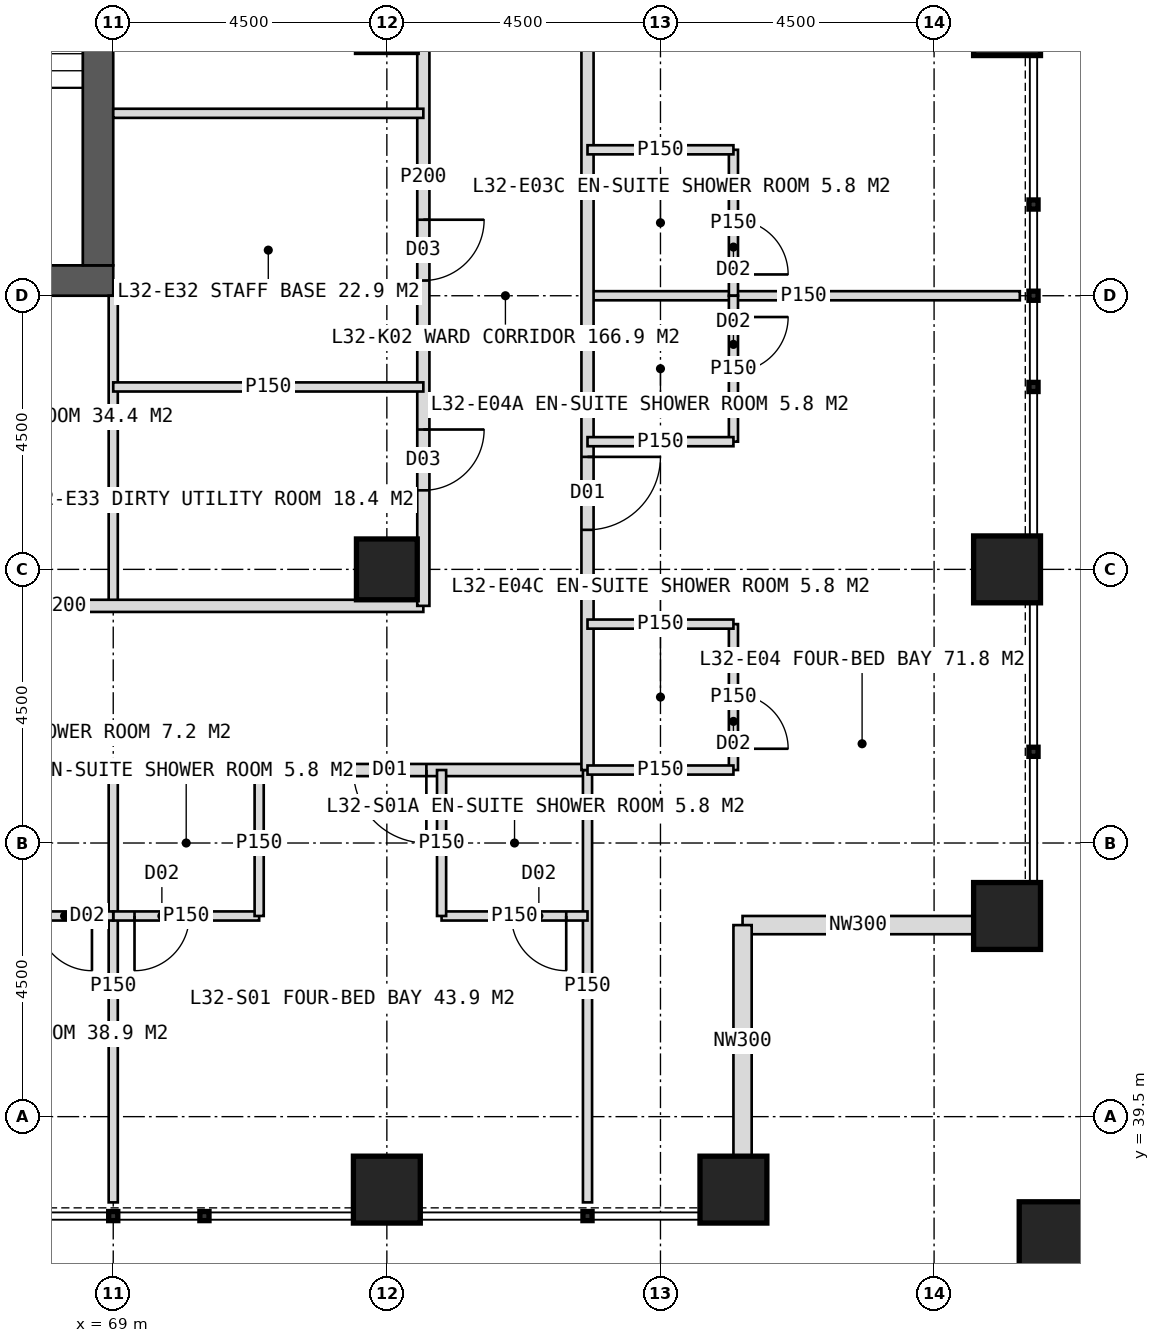
"""IFC4 building model, lengths in metres.
Left out: names, types, materials, properties, quantities, classifications, styles, units other than length and angle.
Written with IfcOpenShell. Run it as: python <this file> out.ifc"""

import sys

from ifc_helpers import new_model, si_unit, direction, frame, frame_2d, origin, origin_2d, place, context, subcontext, project, spatial, rectangle, hollow_rectangle, extrude, element, fill, save


model = new_model("IFC4")
c1 = context("Model", 3, precision=1e-05, world=origin(), true_north=direction((0.0, 1.0)))
c2 = subcontext(c1, "Body", "Model", "MODEL_VIEW")
j1 = project(units=[si_unit("LENGTHUNIT", "METRE"), si_unit("PLANEANGLEUNIT", "RADIAN")], contexts=[c1])
p1 = place(None, origin())
s1 = spatial("IfcSite", under=j1, at=p1, CompositionType="ELEMENT")
p2 = place(p1, origin())
s2 = spatial("IfcBuilding", under=s1, at=p2, CompositionType="ELEMENT")
p3 = place(p2, frame((0.0, 0.0, 136.0)))
s3 = spatial("IfcBuildingStorey", under=s2, at=p3, CompositionType="ELEMENT", Elevation=136.0)
p4 = place(p3, frame((51.0, 53.25, 0.0), z_axis=(0.0, 0.0, 1.0), x_axis=(1.0, 0.0, 0.0)))
e1 = element("IfcWall", 1, at=p4, inside=s3, PredefinedType="SHEAR", context=c2, shape_type="SweptSolid", body=[
    extrude(rectangle(XDim=18.0, YDim=0.5, at=frame_2d((9.0, 0.0))), origin(), (0.0, 0.0, 1.0), 4.0),
])
p5 = place(p4, frame((8.1, 0.0, 0.0)))
e2 = element("IfcOpeningElement", 2, at=p5, cuts=e1, PredefinedType="OPENING", context=c2, shape_type="SweptSolid", body=[
    extrude(rectangle(XDim=1.8, YDim=2.2, at=frame_2d((0.9, 1.1))), frame((0.0, 0.26, 0.0), z_axis=(0.0, -1.0, 0.0), x_axis=(1.0, 0.0, 0.0)), (0.0, 0.0, 1.0), 0.52),
])
p6 = place(p3, frame((68.75, 53.5, 0.0), z_axis=(0.0, 0.0, 1.0), x_axis=(0.0, 1.0, 0.0)))
e3 = element("IfcWall", 3, at=p6, inside=s3, PredefinedType="SHEAR", context=c2, shape_type="SweptSolid", body=[
    extrude(rectangle(XDim=17.0, YDim=0.5, at=frame_2d((8.5, 0.0))), origin(), (0.0, 0.0, 1.0), 4.0),
])
p7 = place(p6, frame((9.5, 0.0, 0.0)))
e4 = element("IfcOpeningElement", 4, at=p7, cuts=e3, PredefinedType="OPENING", context=c2, shape_type="SweptSolid", body=[
    extrude(rectangle(XDim=1.5, YDim=2.2, at=frame_2d((0.75, 1.1))), frame((0.0, 0.26, 0.0), z_axis=(0.0, -1.0, 0.0), x_axis=(1.0, 0.0, 0.0)), (0.0, 0.0, 1.0), 0.52),
])
p8 = place(p3, frame((73.5, 48.5, 0.0), z_axis=(0.0, 0.0, 1.0), x_axis=(1.0, 0.0, 0.0)))
e5 = element("IfcColumn", 5, at=p8, inside=s3, PredefinedType="COLUMN", context=c2, shape_type="SweptSolid", body=[
    extrude(hollow_rectangle(XDim=1.0, YDim=1.0, WallThickness=0.1, at=origin_2d()), origin(), (0.0, 0.0, 1.0), 4.0),
])
for number, where, z_axis, x_axis in (
    (6, (83.7, 42.8, 0.0), (0.0, 0.0, 1.0), (1.0, 0.0, 0.0)),
    (7, (83.7, 48.5, 0.0), (0.0, 0.0, 1.0), (1.0, 0.0, 0.0)),
    (8, (83.7, 57.5, 0.0), (0.0, 0.0, 1.0), (1.0, 0.0, 0.0)),
    (9, (73.5, 38.3, 0.0), (0.0, 0.0, 1.0), (1.0, 0.0, 0.0)),
    (10, (79.2, 38.3, 0.0), (0.0, 0.0, 1.0), (1.0, 0.0, 0.0)),
):
    element("IfcColumn", number, at=place(p3, frame(where, z_axis=z_axis, x_axis=x_axis)), inside=s3, PredefinedType="COLUMN", context=c2, shape_type="SweptSolid", body=[
        extrude(hollow_rectangle(XDim=1.1, YDim=1.1, WallThickness=0.1, at=origin_2d()), origin(), (0.0, 0.0, 1.0), 4.0),
    ])
p9 = place(p3, frame((84.6, 37.4, 0.0), z_axis=(0.0, 0.0, 1.0), x_axis=(1.0, 0.0, 0.0)))
e11 = element("IfcColumn", 11, at=p9, inside=s3, PredefinedType="COLUMN", context=c2, shape_type="SweptSolid", body=[
    extrude(hollow_rectangle(XDim=1.4, YDim=1.4, WallThickness=0.08, at=origin_2d()), origin(), (0.0, 0.0, 1.0), 4.0),
])
for number, where, z_axis, x_axis in (
    (12, (83.15, 42.65, 0.0), (0.0, 0.0, 1.0), (-1.0, 0.0, 0.0)),
    (13, (79.35, 42.65, 0.0), (0.0, 0.0, 1.0), (0.0, -1.0, 0.0)),
):
    element("IfcWall", number, at=place(p3, frame(where, z_axis=z_axis, x_axis=x_axis)), inside=s3, PredefinedType="ELEMENTEDWALL", context=c2, shape_type="SweptSolid", body=[
        extrude(rectangle(XDim=3.8, YDim=0.3, at=frame_2d((1.9, 0.0))), origin(), (0.0, 0.0, 1.0), 4.0),
    ])
p10 = place(p3, frame((69.0, 45.2, 0.0), z_axis=(0.0, 0.0, 1.0), x_axis=(0.0, -1.0, 0.0)))
e14 = element("IfcWall", 14, at=p10, inside=s3, PredefinedType="PARTITIONING", context=c2, shape_type="SweptSolid", body=[
    extrude(rectangle(XDim=7.11, YDim=0.15, at=frame_2d((3.555, 0.0))), origin(), (0.0, 0.0, 1.0), 3.75),
])
p11 = place(p3, frame((76.8, 45.2, 0.0), z_axis=(0.0, 0.0, 1.0), x_axis=(-1.0, 0.0, 0.0)))
e15 = element("IfcWall", 15, at=p11, inside=s3, PredefinedType="PARTITIONING", context=c2, shape_type="SweptSolid", body=[
    extrude(rectangle(XDim=33.6, YDim=0.2, at=frame_2d((16.8, 0.0))), origin(), (0.0, 0.0, 1.0), 3.75),
])
p12 = place(p11, frame((2.65, 0.0, 0.0)))
e16 = element("IfcOpeningElement", 16, at=p12, cuts=e15, PredefinedType="OPENING", context=c2, shape_type="SweptSolid", body=[
    extrude(rectangle(XDim=1.2, YDim=2.2, at=frame_2d((0.6, 1.1))), frame((0.0, 0.11, 0.0), z_axis=(0.0, -1.0, 0.0), x_axis=(1.0, 0.0, 0.0)), (0.0, 0.0, 1.0), 0.22),
])
p13 = place(p11, frame((11.05, 0.0, 0.0)))
e17 = element("IfcOpeningElement", 17, at=p13, cuts=e15, PredefinedType="OPENING", context=c2, shape_type="SweptSolid", body=[
    extrude(rectangle(XDim=1.2, YDim=2.2, at=frame_2d((0.6, 1.1))), frame((0.0, 0.11, 0.0), z_axis=(0.0, -1.0, 0.0), x_axis=(1.0, 0.0, 0.0)), (0.0, 0.0, 1.0), 0.22),
])
p14 = place(p11, frame((17.95, 0.0, 0.0)))
e18 = element("IfcOpeningElement", 18, at=p14, cuts=e15, PredefinedType="OPENING", context=c2, shape_type="SweptSolid", body=[
    extrude(rectangle(XDim=1.2, YDim=2.2, at=frame_2d((0.6, 1.1))), frame((0.0, 0.11, 0.0), z_axis=(0.0, -1.0, 0.0), x_axis=(1.0, 0.0, 0.0)), (0.0, 0.0, 1.0), 0.22),
])
p15 = place(p11, frame((26.95, 0.0, 0.0)))
e19 = element("IfcOpeningElement", 19, at=p15, cuts=e15, PredefinedType="OPENING", context=c2, shape_type="SweptSolid", body=[
    extrude(rectangle(XDim=1.2, YDim=2.2, at=frame_2d((0.6, 1.1))), frame((0.0, 0.11, 0.0), z_axis=(0.0, -1.0, 0.0), x_axis=(1.0, 0.0, 0.0)), (0.0, 0.0, 1.0), 0.22),
])
p16 = place(p3, frame((76.8, 45.2, 0.0), z_axis=(0.0, 0.0, 1.0), x_axis=(0.0, -1.0, 0.0)))
e20 = element("IfcWall", 20, at=p16, inside=s3, PredefinedType="PARTITIONING", context=c2, shape_type="SweptSolid", body=[
    extrude(rectangle(XDim=7.11, YDim=0.15, at=frame_2d((3.555, 0.0))), origin(), (0.0, 0.0, 1.0), 3.75),
])
p17 = place(p3, frame((76.8, 42.8, 0.0), z_axis=(0.0, 0.0, 1.0), x_axis=(-1.0, 0.0, 0.0)))
e21 = element("IfcWall", 21, at=p17, inside=s3, PredefinedType="PARTITIONING", context=c2, shape_type="SweptSolid", body=[
    extrude(rectangle(XDim=2.4, YDim=0.15, at=frame_2d((1.2, 0.0))), origin(), (0.0, 0.0, 1.0), 2.997),
])
p18 = place(p17, frame((0.35, 0.0, 0.0)))
e22 = element("IfcOpeningElement", 22, at=p18, cuts=e21, PredefinedType="OPENING", context=c2, shape_type="SweptSolid", body=[
    extrude(rectangle(XDim=0.9, YDim=2.1, at=frame_2d((0.45, 1.05))), frame((0.0, 0.085, 0.0), z_axis=(0.0, -1.0, 0.0), x_axis=(1.0, 0.0, 0.0)), (0.0, 0.0, 1.0), 0.17),
])
p19 = place(p3, frame((74.4, 45.2, 0.0), z_axis=(0.0, 0.0, 1.0), x_axis=(0.0, -1.0, 0.0)))
e23 = element("IfcWall", 23, at=p19, inside=s3, PredefinedType="PARTITIONING", context=c2, shape_type="SweptSolid", body=[
    extrude(rectangle(XDim=2.4, YDim=0.15, at=frame_2d((1.2, 0.0))), origin(), (0.0, 0.0, 1.0), 3.75),
])
p20 = place(p3, frame((71.4, 42.8, 0.0), z_axis=(0.0, 0.0, 1.0), x_axis=(-1.0, 0.0, 0.0)))
e24 = element("IfcWall", 24, at=p20, inside=s3, PredefinedType="PARTITIONING", context=c2, shape_type="SweptSolid", body=[
    extrude(rectangle(XDim=2.4, YDim=0.15, at=frame_2d((1.2, 0.0))), origin(), (0.0, 0.0, 1.0), 3.75),
])
p21 = place(p20, frame((1.15, 0.0, 0.0)))
e25 = element("IfcOpeningElement", 25, at=p21, cuts=e24, PredefinedType="OPENING", context=c2, shape_type="SweptSolid", body=[
    extrude(rectangle(XDim=0.9, YDim=2.1, at=frame_2d((0.45, 1.05))), frame((0.0, 0.085, 0.0), z_axis=(0.0, -1.0, 0.0), x_axis=(1.0, 0.0, 0.0)), (0.0, 0.0, 1.0), 0.17),
])
p22 = place(p3, frame((71.4, 45.2, 0.0), z_axis=(0.0, 0.0, 1.0), x_axis=(0.0, -1.0, 0.0)))
e26 = element("IfcWall", 26, at=p22, inside=s3, PredefinedType="PARTITIONING", context=c2, shape_type="SweptSolid", body=[
    extrude(rectangle(XDim=2.4, YDim=0.15, at=frame_2d((1.2, 0.0))), origin(), (0.0, 0.0, 1.0), 3.75),
])
p23 = place(p3, frame((69.0, 42.8, 0.0), z_axis=(0.0, 0.0, 1.0), x_axis=(-1.0, 0.0, 0.0)))
e27 = element("IfcWall", 27, at=p23, inside=s3, PredefinedType="PARTITIONING", context=c2, shape_type="SweptSolid", body=[
    extrude(rectangle(XDim=3.0, YDim=0.15, at=frame_2d((1.5, 0.0))), origin(), (0.0, 0.0, 1.0), 3.75),
])
p24 = place(p23, frame((0.35, 0.0, 0.0)))
e28 = element("IfcOpeningElement", 28, at=p24, cuts=e27, PredefinedType="OPENING", context=c2, shape_type="SweptSolid", body=[
    extrude(rectangle(XDim=0.9, YDim=2.1, at=frame_2d((0.45, 1.05))), frame((0.0, 0.085, 0.0), z_axis=(0.0, -1.0, 0.0), x_axis=(1.0, 0.0, 0.0)), (0.0, 0.0, 1.0), 0.17),
])
p25 = place(p3, frame((69.0, 53.0, 0.0), z_axis=(0.0, 0.0, 1.0), x_axis=(0.0, -1.0, 0.0)))
e29 = element("IfcWall", 29, at=p25, inside=s3, PredefinedType="PARTITIONING", context=c2, shape_type="SweptSolid", body=[
    extrude(rectangle(XDim=5.1, YDim=0.15, at=frame_2d((2.55, 0.0))), origin(), (0.0, 0.0, 1.0), 3.75),
])
p26 = place(p3, frame((74.1, 47.9, 0.0), z_axis=(0.0, 0.0, 1.0), x_axis=(-1.0, 0.0, 0.0)))
e30 = element("IfcWall", 30, at=p26, inside=s3, PredefinedType="PARTITIONING", context=c2, shape_type="SweptSolid", body=[
    extrude(rectangle(XDim=11.85, YDim=0.2, at=frame_2d((5.925, 0.0))), origin(), (0.0, 0.0, 1.0), 3.75),
])
p27 = place(p26, frame((6.55, 0.0, 0.0)))
e31 = element("IfcOpeningElement", 31, at=p27, cuts=e30, PredefinedType="OPENING", context=c2, shape_type="SweptSolid", body=[
    extrude(rectangle(XDim=1.0, YDim=2.1, at=frame_2d((0.5, 1.05))), frame((0.0, 0.11, 0.0), z_axis=(0.0, -1.0, 0.0), x_axis=(1.0, 0.0, 0.0)), (0.0, 0.0, 1.0), 0.22),
])
p28 = place(p3, frame((76.8, 53.0, 0.0), z_axis=(0.0, 0.0, 1.0), x_axis=(1.0, 0.0, 0.0)))
e32 = element("IfcWall", 32, at=p28, inside=s3, PredefinedType="PARTITIONING", context=c2, shape_type="SweptSolid", body=[
    extrude(rectangle(XDim=7.11, YDim=0.15, at=frame_2d((3.555, 0.0))), origin(), (0.0, 0.0, 1.0), 3.75),
])
p29 = place(p3, frame((76.8, 78.8, 0.0), z_axis=(0.0, 0.0, 1.0), x_axis=(0.0, -1.0, 0.0)))
e33 = element("IfcWall", 33, at=p29, inside=s3, PredefinedType="PARTITIONING", context=c2, shape_type="SweptSolid", body=[
    extrude(rectangle(XDim=33.6, YDim=0.2, at=frame_2d((16.8, 0.0))), origin(), (0.0, 0.0, 1.0), 3.75),
])
p30 = place(p29, frame((2.65, 0.0, 0.0)))
e34 = element("IfcOpeningElement", 34, at=p30, cuts=e33, PredefinedType="OPENING", context=c2, shape_type="SweptSolid", body=[
    extrude(rectangle(XDim=1.2, YDim=2.2, at=frame_2d((0.6, 1.1))), frame((0.0, 0.11, 0.0), z_axis=(0.0, -1.0, 0.0), x_axis=(1.0, 0.0, 0.0)), (0.0, 0.0, 1.0), 0.22),
])
p31 = place(p29, frame((8.95, 0.0, 0.0)))
e35 = element("IfcOpeningElement", 35, at=p31, cuts=e33, PredefinedType="OPENING", context=c2, shape_type="SweptSolid", body=[
    extrude(rectangle(XDim=1.2, YDim=2.2, at=frame_2d((0.6, 1.1))), frame((0.0, 0.11, 0.0), z_axis=(0.0, -1.0, 0.0), x_axis=(1.0, 0.0, 0.0)), (0.0, 0.0, 1.0), 0.22),
])
p32 = place(p29, frame((19.45, 0.0, 0.0)))
e36 = element("IfcOpeningElement", 36, at=p32, cuts=e33, PredefinedType="OPENING", context=c2, shape_type="SweptSolid", body=[
    extrude(rectangle(XDim=1.2, YDim=2.2, at=frame_2d((0.6, 1.1))), frame((0.0, 0.11, 0.0), z_axis=(0.0, -1.0, 0.0), x_axis=(1.0, 0.0, 0.0)), (0.0, 0.0, 1.0), 0.22),
])
p33 = place(p29, frame((28.45, 0.0, 0.0)))
e37 = element("IfcOpeningElement", 37, at=p33, cuts=e33, PredefinedType="OPENING", context=c2, shape_type="SweptSolid", body=[
    extrude(rectangle(XDim=1.2, YDim=2.2, at=frame_2d((0.6, 1.1))), frame((0.0, 0.11, 0.0), z_axis=(0.0, -1.0, 0.0), x_axis=(1.0, 0.0, 0.0)), (0.0, 0.0, 1.0), 0.22),
])
p34 = place(p3, frame((79.2, 55.4, 0.0), z_axis=(0.0, 0.0, 1.0), x_axis=(0.0, -1.0, 0.0)))
e38 = element("IfcWall", 38, at=p34, inside=s3, PredefinedType="PARTITIONING", context=c2, shape_type="SweptSolid", body=[
    extrude(rectangle(XDim=2.4, YDim=0.15, at=frame_2d((1.2, 0.0))), origin(), (0.0, 0.0, 1.0), 3.75),
])
p35 = place(p34, frame((1.15, 0.0, 0.0)))
e39 = element("IfcOpeningElement", 39, at=p35, cuts=e38, PredefinedType="OPENING", context=c2, shape_type="SweptSolid", body=[
    extrude(rectangle(XDim=0.9, YDim=2.1, at=frame_2d((0.45, 1.05))), frame((0.0, 0.085, 0.0), z_axis=(0.0, -1.0, 0.0), x_axis=(1.0, 0.0, 0.0)), (0.0, 0.0, 1.0), 0.17),
])
p36 = place(p3, frame((76.8, 55.4, 0.0), z_axis=(0.0, 0.0, 1.0), x_axis=(1.0, 0.0, 0.0)))
e40 = element("IfcWall", 40, at=p36, inside=s3, PredefinedType="PARTITIONING", context=c2, shape_type="SweptSolid", body=[
    extrude(rectangle(XDim=2.4, YDim=0.15, at=frame_2d((1.2, 0.0))), origin(), (0.0, 0.0, 1.0), 3.75),
])
p37 = place(p3, frame((79.2, 53.0, 0.0), z_axis=(0.0, 0.0, 1.0), x_axis=(0.0, -1.0, 0.0)))
e41 = element("IfcWall", 41, at=p37, inside=s3, PredefinedType="PARTITIONING", context=c2, shape_type="SweptSolid", body=[
    extrude(rectangle(XDim=2.4, YDim=0.15, at=frame_2d((1.2, 0.0))), origin(), (0.0, 0.0, 1.0), 3.75),
])
p38 = place(p37, frame((0.35, 0.0, 0.0)))
e42 = element("IfcOpeningElement", 42, at=p38, cuts=e41, PredefinedType="OPENING", context=c2, shape_type="SweptSolid", body=[
    extrude(rectangle(XDim=0.9, YDim=2.1, at=frame_2d((0.45, 1.05))), frame((0.0, 0.085, 0.0), z_axis=(0.0, -1.0, 0.0), x_axis=(1.0, 0.0, 0.0)), (0.0, 0.0, 1.0), 0.17),
])
p39 = place(p3, frame((76.8, 50.6, 0.0), z_axis=(0.0, 0.0, 1.0), x_axis=(1.0, 0.0, 0.0)))
e43 = element("IfcWall", 43, at=p39, inside=s3, PredefinedType="PARTITIONING", context=c2, shape_type="SweptSolid", body=[
    extrude(rectangle(XDim=2.4, YDim=0.15, at=frame_2d((1.2, 0.0))), origin(), (0.0, 0.0, 1.0), 3.75),
])
p40 = place(p3, frame((79.2, 47.6, 0.0), z_axis=(0.0, 0.0, 1.0), x_axis=(0.0, -1.0, 0.0)))
e44 = element("IfcWall", 44, at=p40, inside=s3, PredefinedType="PARTITIONING", context=c2, shape_type="SweptSolid", body=[
    extrude(rectangle(XDim=2.4, YDim=0.15, at=frame_2d((1.2, 0.0))), origin(), (0.0, 0.0, 1.0), 2.997),
])
p41 = place(p40, frame((1.15, 0.0, 0.0)))
e45 = element("IfcOpeningElement", 45, at=p41, cuts=e44, PredefinedType="OPENING", context=c2, shape_type="SweptSolid", body=[
    extrude(rectangle(XDim=0.9, YDim=2.1, at=frame_2d((0.45, 1.05))), frame((0.0, 0.085, 0.0), z_axis=(0.0, -1.0, 0.0), x_axis=(1.0, 0.0, 0.0)), (0.0, 0.0, 1.0), 0.17),
])
for number, where, z_axis, x_axis in (
    (46, (76.8, 47.6, 0.0), (0.0, 0.0, 1.0), (1.0, 0.0, 0.0)),
    (47, (76.8, 45.2, 0.0), (0.0, 0.0, 1.0), (1.0, 0.0, 0.0)),
):
    element("IfcWall", number, at=place(p3, frame(where, z_axis=z_axis, x_axis=x_axis)), inside=s3, PredefinedType="PARTITIONING", context=c2, shape_type="SweptSolid", body=[
        extrude(rectangle(XDim=2.4, YDim=0.15, at=frame_2d((1.2, 0.0))), origin(), (0.0, 0.0, 1.0), 3.75),
    ])
p42 = place(p3, frame((74.1, 62.0, 0.0), z_axis=(0.0, 0.0, 1.0), x_axis=(0.0, -1.0, 0.0)))
e48 = element("IfcWall", 48, at=p42, inside=s3, PredefinedType="PARTITIONING", context=c2, shape_type="SweptSolid", body=[
    extrude(rectangle(XDim=14.1, YDim=0.2, at=frame_2d((7.05, 0.0))), origin(), (0.0, 0.0, 1.0), 3.75),
])
p43 = place(p42, frame((2.5, 0.0, 0.0)))
e49 = element("IfcOpeningElement", 49, at=p43, cuts=e48, PredefinedType="OPENING", context=c2, shape_type="SweptSolid", body=[
    extrude(rectangle(XDim=1.0, YDim=2.1, at=frame_2d((0.5, 1.05))), frame((0.0, 0.11, 0.0), z_axis=(0.0, -1.0, 0.0), x_axis=(1.0, 0.0, 0.0)), (0.0, 0.0, 1.0), 0.22),
])
p44 = place(p42, frame((7.75, 0.0, 0.0)))
e50 = element("IfcOpeningElement", 50, at=p44, cuts=e48, PredefinedType="OPENING", context=c2, shape_type="SweptSolid", body=[
    extrude(rectangle(XDim=1.0, YDim=2.1, at=frame_2d((0.5, 1.05))), frame((0.0, 0.11, 0.0), z_axis=(0.0, -1.0, 0.0), x_axis=(1.0, 0.0, 0.0)), (0.0, 0.0, 1.0), 0.22),
])
p45 = place(p42, frame((11.2, 0.0, 0.0)))
e51 = element("IfcOpeningElement", 51, at=p45, cuts=e48, PredefinedType="OPENING", context=c2, shape_type="SweptSolid", body=[
    extrude(rectangle(XDim=1.0, YDim=2.1, at=frame_2d((0.5, 1.05))), frame((0.0, 0.11, 0.0), z_axis=(0.0, -1.0, 0.0), x_axis=(1.0, 0.0, 0.0)), (0.0, 0.0, 1.0), 0.22),
])
for number, where, z_axis, x_axis in (
    (52, (69.0, 56.0, 0.0), (0.0, 0.0, 1.0), (1.0, 0.0, 0.0)),
    (53, (69.0, 51.5, 0.0), (0.0, 0.0, 1.0), (1.0, 0.0, 0.0)),
):
    element("IfcWall", number, at=place(p3, frame(where, z_axis=z_axis, x_axis=x_axis)), inside=s3, PredefinedType="PARTITIONING", context=c2, shape_type="SweptSolid", body=[
        extrude(rectangle(XDim=5.1, YDim=0.15, at=frame_2d((2.55, 0.0))), origin(), (0.0, 0.0, 1.0), 3.75),
    ])
p46 = place(p12, origin())
e54 = element("IfcDoor", 54, at=p46, inside=s3, OperationType="SINGLE_SWING_LEFT", PredefinedType="DOOR", context=c2, shape_type="SweptSolid", body=[
    extrude(rectangle(XDim=1.2, YDim=2.2, at=frame_2d((0.6, 1.1))), frame((0.0, 0.025, 0.0), z_axis=(0.0, -1.0, 0.0), x_axis=(1.0, 0.0, 0.0)), (0.0, 0.0, 1.0), 0.05),
])
fill(e16, e54)
p47 = place(p18, origin())
e55 = element("IfcDoor", 55, at=p47, inside=s3, OperationType="SINGLE_SWING_LEFT", PredefinedType="DOOR", context=c2, shape_type="SweptSolid", body=[
    extrude(rectangle(XDim=0.9, YDim=2.1, at=frame_2d((0.45, 1.05))), frame((0.0, 0.025, 0.0), z_axis=(0.0, -1.0, 0.0), x_axis=(1.0, 0.0, 0.0)), (0.0, 0.0, 1.0), 0.05),
])
fill(e22, e55)
p48 = place(p21, origin())
e56 = element("IfcDoor", 56, at=p48, inside=s3, OperationType="SINGLE_SWING_RIGHT", PredefinedType="DOOR", context=c2, shape_type="SweptSolid", body=[
    extrude(rectangle(XDim=0.9, YDim=2.1, at=frame_2d((0.45, 1.05))), frame((0.0, 0.025, 0.0), z_axis=(0.0, -1.0, 0.0), x_axis=(1.0, 0.0, 0.0)), (0.0, 0.0, 1.0), 0.05),
])
fill(e25, e56)
p49 = place(p24, origin())
e57 = element("IfcDoor", 57, at=p49, inside=s3, OperationType="SINGLE_SWING_LEFT", PredefinedType="DOOR", context=c2, shape_type="SweptSolid", body=[
    extrude(rectangle(XDim=0.9, YDim=2.1, at=frame_2d((0.45, 1.05))), frame((0.0, 0.025, 0.0), z_axis=(0.0, -1.0, 0.0), x_axis=(1.0, 0.0, 0.0)), (0.0, 0.0, 1.0), 0.05),
])
fill(e28, e57)
p50 = place(p35, origin())
e58 = element("IfcDoor", 58, at=p50, inside=s3, OperationType="SINGLE_SWING_RIGHT", PredefinedType="DOOR", context=c2, shape_type="SweptSolid", body=[
    extrude(rectangle(XDim=0.9, YDim=2.1, at=frame_2d((0.45, 1.05))), frame((0.0, 0.025, 0.0), z_axis=(0.0, -1.0, 0.0), x_axis=(1.0, 0.0, 0.0)), (0.0, 0.0, 1.0), 0.05),
])
fill(e39, e58)
p51 = place(p33, origin())
e59 = element("IfcDoor", 59, at=p51, inside=s3, OperationType="SINGLE_SWING_LEFT", PredefinedType="DOOR", context=c2, shape_type="SweptSolid", body=[
    extrude(rectangle(XDim=1.2, YDim=2.2, at=frame_2d((0.6, 1.1))), frame((0.0, 0.025, 0.0), z_axis=(0.0, -1.0, 0.0), x_axis=(1.0, 0.0, 0.0)), (0.0, 0.0, 1.0), 0.05),
])
fill(e37, e59)
p52 = place(p38, origin())
e60 = element("IfcDoor", 60, at=p52, inside=s3, OperationType="SINGLE_SWING_LEFT", PredefinedType="DOOR", context=c2, shape_type="SweptSolid", body=[
    extrude(rectangle(XDim=0.9, YDim=2.1, at=frame_2d((0.45, 1.05))), frame((0.0, 0.025, 0.0), z_axis=(0.0, -1.0, 0.0), x_axis=(1.0, 0.0, 0.0)), (0.0, 0.0, 1.0), 0.05),
])
fill(e42, e60)
p53 = place(p41, origin())
e61 = element("IfcDoor", 61, at=p53, inside=s3, OperationType="SINGLE_SWING_RIGHT", PredefinedType="DOOR", context=c2, shape_type="SweptSolid", body=[
    extrude(rectangle(XDim=0.9, YDim=2.1, at=frame_2d((0.45, 1.05))), frame((0.0, 0.025, 0.0), z_axis=(0.0, -1.0, 0.0), x_axis=(1.0, 0.0, 0.0)), (0.0, 0.0, 1.0), 0.05),
])
fill(e45, e61)
p54 = place(p44, origin())
e62 = element("IfcDoor", 62, at=p54, inside=s3, OperationType="SINGLE_SWING_LEFT", PredefinedType="DOOR", context=c2, shape_type="SweptSolid", body=[
    extrude(rectangle(XDim=1.0, YDim=2.1, at=frame_2d((0.5, 1.05))), frame((0.0, 0.025, 0.0), z_axis=(0.0, -1.0, 0.0), x_axis=(1.0, 0.0, 0.0)), (0.0, 0.0, 1.0), 0.05),
])
fill(e50, e62)
p55 = place(p45, origin())
e63 = element("IfcDoor", 63, at=p55, inside=s3, OperationType="SINGLE_SWING_LEFT", PredefinedType="DOOR", context=c2, shape_type="SweptSolid", body=[
    extrude(rectangle(XDim=1.0, YDim=2.1, at=frame_2d((0.5, 1.05))), frame((0.0, 0.025, 0.0), z_axis=(0.0, -1.0, 0.0), x_axis=(1.0, 0.0, 0.0)), (0.0, 0.0, 1.0), 0.05),
])
fill(e51, e63)
save(model, sys.argv[1])
